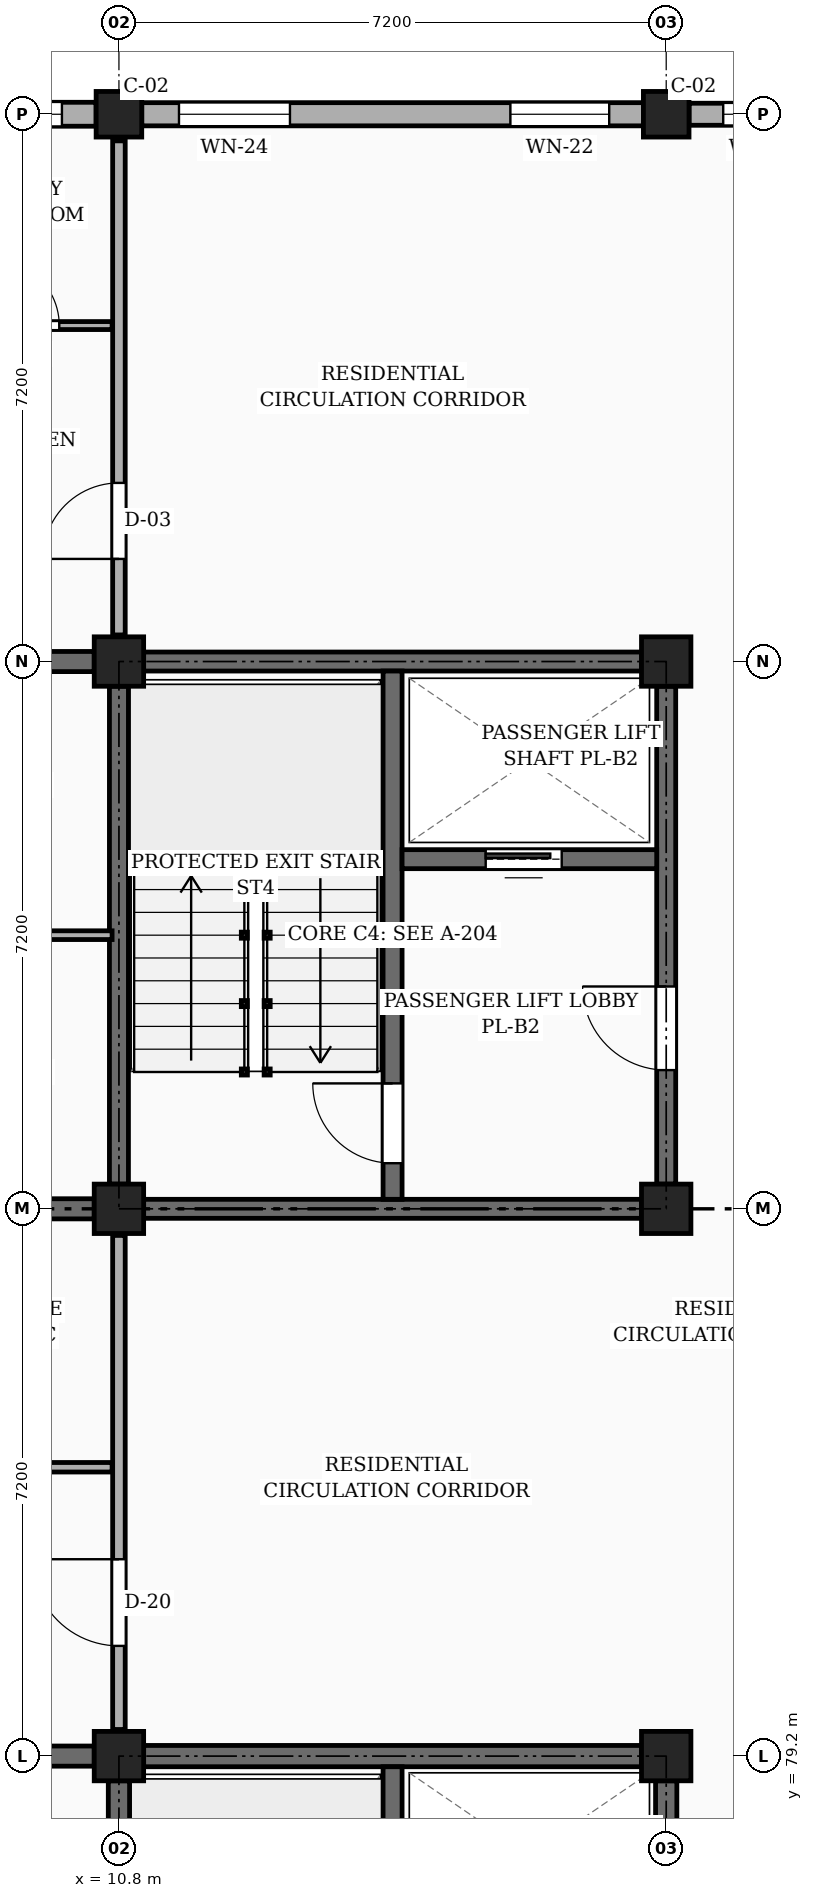
"""IFC4 building model, lengths in metres.
Left out: names, types, materials, properties, quantities, classifications, styles, units other than length and angle.
Written with IfcOpenShell. Run it as: python <this file> out.ifc"""

import sys

from ifc_helpers import new_model, si_unit, direction, frame, frame_2d, origin, origin_2d, place, context, subcontext, project, spatial, rectangle, extrude, element, fill, save


model = new_model("IFC4")
c1 = context("Model", 3, precision=1e-05, world=origin(), true_north=direction((0.0, 1.0)))
c2 = subcontext(c1, "Body", "Model", "MODEL_VIEW")
j1 = project(units=[si_unit("LENGTHUNIT", "METRE"), si_unit("PLANEANGLEUNIT", "RADIAN")], contexts=[c1])
p1 = place(None, origin())
s1 = spatial("IfcSite", under=j1, at=p1, CompositionType="ELEMENT")
p2 = place(p1, origin())
s2 = spatial("IfcBuilding", under=s1, at=p2, CompositionType="ELEMENT")
p3 = place(p2, frame((0.0, 0.0, 4.5)))
s3 = spatial("IfcBuildingStorey", under=s2, at=p3, CompositionType="ELEMENT", Elevation=4.5)
for number, where, z_axis, x_axis in (
    (1, (10.8, 79.2, 0.0), (0.0, 0.0, 1.0), (1.0, 0.0, 0.0)),
    (2, (10.8, 86.4, 0.0), (0.0, 0.0, 1.0), (1.0, 0.0, 0.0)),
    (3, (10.8, 93.6, 0.0), (0.0, 0.0, 1.0), (1.0, 0.0, 0.0)),
):
    element("IfcColumn", number, at=place(p3, frame(where, z_axis=z_axis, x_axis=x_axis)), inside=s3, PredefinedType="COLUMN", context=c2, shape_type="SweptSolid", body=[
        extrude(rectangle(XDim=0.65, YDim=0.65, at=origin_2d()), origin(), (0.0, 0.0, 1.0), 3.15),
    ])
p4 = place(p3, frame((10.8, 100.8, 0.0), z_axis=(0.0, 0.0, 1.0), x_axis=(1.0, 0.0, 0.0)))
e4 = element("IfcColumn", 4, at=p4, inside=s3, PredefinedType="COLUMN", context=c2, shape_type="SweptSolid", body=[
    extrude(rectangle(XDim=0.6, YDim=0.6, at=origin_2d()), origin(), (0.0, 0.0, 1.0), 3.15),
])
for number, where, z_axis, x_axis in (
    (5, (18.0, 79.2, 0.0), (0.0, 0.0, 1.0), (1.0, 0.0, 0.0)),
    (6, (18.0, 86.4, 0.0), (0.0, 0.0, 1.0), (1.0, 0.0, 0.0)),
    (7, (18.0, 93.6, 0.0), (0.0, 0.0, 1.0), (1.0, 0.0, 0.0)),
):
    element("IfcColumn", number, at=place(p3, frame(where, z_axis=z_axis, x_axis=x_axis)), inside=s3, PredefinedType="COLUMN", context=c2, shape_type="SweptSolid", body=[
        extrude(rectangle(XDim=0.65, YDim=0.65, at=origin_2d()), origin(), (0.0, 0.0, 1.0), 3.15),
    ])
p5 = place(p3, frame((18.0, 100.8, 0.0), z_axis=(0.0, 0.0, 1.0), x_axis=(1.0, 0.0, 0.0)))
e8 = element("IfcColumn", 8, at=p5, inside=s3, PredefinedType="COLUMN", context=c2, shape_type="SweptSolid", body=[
    extrude(rectangle(XDim=0.6, YDim=0.6, at=origin_2d()), origin(), (0.0, 0.0, 1.0), 3.15),
])
p6 = place(p3, frame((3.9, 79.2, 0.0), z_axis=(0.0, 0.0, 1.0), x_axis=(1.0, 0.0, 0.0)))
e9 = element("IfcWall", 9, at=p6, inside=s3, PredefinedType="SOLIDWALL", context=c2, shape_type="SweptSolid", body=[
    extrude(rectangle(XDim=6.575, YDim=0.265, at=frame_2d((3.288, 0.0))), origin(), (0.0, 0.0, 1.0), 2.21),
])
p7 = place(p3, frame((3.9, 86.4, 0.0), z_axis=(0.0, 0.0, 1.0), x_axis=(1.0, 0.0, 0.0)))
e10 = element("IfcWall", 10, at=p7, inside=s3, PredefinedType="SOLIDWALL", context=c2, shape_type="SweptSolid", body=[
    extrude(rectangle(XDim=6.575, YDim=0.265, at=frame_2d((3.288, 0.0))), origin(), (0.0, 0.0, 1.0), 2.21),
])
p8 = place(p7, frame((1.35, 0.0, 0.0)))
e11 = element("IfcOpeningElement", 11, at=p8, cuts=e10, PredefinedType="OPENING", context=c2, shape_type="SweptSolid", body=[
    extrude(rectangle(XDim=0.98, YDim=2.12, at=frame_2d((0.49, 1.06))), frame((0.0, 0.143, 0.0), z_axis=(0.0, -1.0, 0.0), x_axis=(1.0, 0.0, 0.0)), (0.0, 0.0, 1.0), 0.285),
])
p9 = place(p3, frame((3.9, 93.6, 0.0), z_axis=(0.0, 0.0, 1.0), x_axis=(1.0, 0.0, 0.0)))
e12 = element("IfcWall", 12, at=p9, inside=s3, PredefinedType="SOLIDWALL", context=c2, shape_type="SweptSolid", body=[
    extrude(rectangle(XDim=6.575, YDim=0.265, at=frame_2d((3.288, 0.0))), origin(), (0.0, 0.0, 1.0), 2.21),
])
p10 = place(p3, frame((24.9, 100.8, 0.0), z_axis=(0.0, 0.0, 1.0), x_axis=(-1.0, 0.0, 0.0)))
e13 = element("IfcWall", 13, at=p10, inside=s3, PredefinedType="SOLIDWALL", context=c2, shape_type="SweptSolid", body=[
    extrude(rectangle(XDim=6.6, YDim=0.29, at=frame_2d((3.3, 0.0))), origin(), (0.0, 0.0, 1.0), 2.48),
])
p11 = place(p10, frame((0.95, 0.0, 0.78)))
e14 = element("IfcOpeningElement", 14, at=p11, cuts=e13, PredefinedType="OPENING", context=c2, shape_type="SweptSolid", body=[
    extrude(rectangle(XDim=1.06, YDim=1.36, at=frame_2d((0.53, 0.68))), frame((0.0, 0.155, 0.0), z_axis=(0.0, -1.0, 0.0), x_axis=(1.0, 0.0, 0.0)), (0.0, 0.0, 1.0), 0.31),
])
p12 = place(p10, frame((3.2, 0.0, 0.78)))
e15 = element("IfcOpeningElement", 15, at=p12, cuts=e13, PredefinedType="OPENING", context=c2, shape_type="SweptSolid", body=[
    extrude(rectangle(XDim=1.22, YDim=1.36, at=frame_2d((0.61, 0.68))), frame((0.0, 0.155, 0.0), z_axis=(0.0, -1.0, 0.0), x_axis=(1.0, 0.0, 0.0)), (0.0, 0.0, 1.0), 0.31),
])
p13 = place(p10, frame((5.11, 0.0, 0.78)))
e16 = element("IfcOpeningElement", 16, at=p13, cuts=e13, PredefinedType="OPENING", context=c2, shape_type="SweptSolid", body=[
    extrude(rectangle(XDim=1.04, YDim=1.26, at=frame_2d((0.52, 0.63))), frame((0.0, 0.155, 0.0), z_axis=(0.0, -1.0, 0.0), x_axis=(1.0, 0.0, 0.0)), (0.0, 0.0, 1.0), 0.31),
])
p14 = place(p3, frame((17.7, 100.8, 0.0), z_axis=(0.0, 0.0, 1.0), x_axis=(-1.0, 0.0, 0.0)))
e17 = element("IfcWall", 17, at=p14, inside=s3, PredefinedType="SOLIDWALL", context=c2, shape_type="SweptSolid", body=[
    extrude(rectangle(XDim=6.6, YDim=0.305, at=frame_2d((3.3, 0.0))), origin(), (0.0, 0.0, 1.0), 2.48),
])
p15 = place(p14, frame((0.45, 0.0, 0.78)))
e18 = element("IfcOpeningElement", 18, at=p15, cuts=e17, PredefinedType="OPENING", context=c2, shape_type="SweptSolid", body=[
    extrude(rectangle(XDim=1.3, YDim=1.36, at=frame_2d((0.65, 0.68))), frame((0.0, 0.163, 0.0), z_axis=(0.0, -1.0, 0.0), x_axis=(1.0, 0.0, 0.0)), (0.0, 0.0, 1.0), 0.325),
])
p16 = place(p14, frame((4.65, 0.0, 0.78)))
e19 = element("IfcOpeningElement", 19, at=p16, cuts=e17, PredefinedType="OPENING", context=c2, shape_type="SweptSolid", body=[
    extrude(rectangle(XDim=1.46, YDim=1.36, at=frame_2d((0.73, 0.68))), frame((0.0, 0.163, 0.0), z_axis=(0.0, -1.0, 0.0), x_axis=(1.0, 0.0, 0.0)), (0.0, 0.0, 1.0), 0.325),
])
p17 = place(p3, frame((10.5, 100.8, 0.0), z_axis=(0.0, 0.0, 1.0), x_axis=(-1.0, 0.0, 0.0)))
e20 = element("IfcWall", 20, at=p17, inside=s3, PredefinedType="SOLIDWALL", context=c2, shape_type="SweptSolid", body=[
    extrude(rectangle(XDim=6.6, YDim=0.315, at=frame_2d((3.3, 0.0))), origin(), (0.0, 0.0, 1.0), 2.48),
])
p18 = place(p17, frame((0.45, 0.0, 0.78)))
e21 = element("IfcOpeningElement", 21, at=p18, cuts=e20, PredefinedType="OPENING", context=c2, shape_type="SweptSolid", body=[
    extrude(rectangle(XDim=1.36, YDim=1.26, at=frame_2d((0.68, 0.63))), frame((0.0, 0.167, 0.0), z_axis=(0.0, -1.0, 0.0), x_axis=(1.0, 0.0, 0.0)), (0.0, 0.0, 1.0), 0.335),
])
p19 = place(p17, frame((3.765, 0.0, 0.78)))
e22 = element("IfcOpeningElement", 22, at=p19, cuts=e20, PredefinedType="OPENING", context=c2, shape_type="SweptSolid", body=[
    extrude(rectangle(XDim=1.05, YDim=1.44, at=frame_2d((0.525, 0.72))), frame((0.0, 0.167, 0.0), z_axis=(0.0, -1.0, 0.0), x_axis=(1.0, 0.0, 0.0)), (0.0, 0.0, 1.0), 0.335),
])
for number, where, z_axis, x_axis in (
    (23, (10.8, 72.325, 0.0), (0.0, 0.0, 1.0), (0.0, 1.0, 0.0)),
    (24, (11.125, 79.2, 0.0), (0.0, 0.0, 1.0), (1.0, 0.0, 0.0)),
):
    element("IfcWall", number, at=place(p3, frame(where, z_axis=z_axis, x_axis=x_axis)), inside=s3, PredefinedType="SHEAR", context=c2, shape_type="SweptSolid", body=[
        extrude(rectangle(XDim=6.55, YDim=0.28, at=frame_2d((3.275, 0.0))), origin(), (0.0, 0.0, 1.0), 2.91),
    ])
p20 = place(p3, frame((18.0, 72.325, 0.0), z_axis=(0.0, 0.0, 1.0), x_axis=(0.0, 1.0, 0.0)))
e25 = element("IfcWall", 25, at=p20, inside=s3, PredefinedType="SHEAR", context=c2, shape_type="SweptSolid", body=[
    extrude(rectangle(XDim=6.55, YDim=0.28, at=frame_2d((3.275, 0.0))), origin(), (0.0, 0.0, 1.0), 2.91),
])
p21 = place(p20, frame((1.5, 0.0, 0.0)))
e26 = element("IfcOpeningElement", 26, at=p21, cuts=e25, PredefinedType="OPENING", context=c2, shape_type="SweptSolid", body=[
    extrude(rectangle(XDim=1.1, YDim=2.15, at=frame_2d((0.55, 1.075))), frame((0.0, 0.15, 0.0), z_axis=(0.0, -1.0, 0.0), x_axis=(1.0, 0.0, 0.0)), (0.0, 0.0, 1.0), 0.3),
])
p22 = place(p3, frame((14.4, 72.14, 0.0), z_axis=(0.0, 0.0, 1.0), x_axis=(0.0, 1.0, 0.0)))
e27 = element("IfcWall", 27, at=p22, inside=s3, PredefinedType="SHEAR", context=c2, shape_type="SweptSolid", body=[
    extrude(rectangle(XDim=6.92, YDim=0.25, at=frame_2d((3.46, 0.0))), origin(), (0.0, 0.0, 1.0), 2.91),
])
p23 = place(p22, frame((0.46, 0.0, 0.0)))
e28 = element("IfcOpeningElement", 28, at=p23, cuts=e27, PredefinedType="OPENING", context=c2, shape_type="SweptSolid", body=[
    extrude(rectangle(XDim=1.05, YDim=2.15, at=frame_2d((0.525, 1.075))), frame((0.0, 0.135, 0.0), z_axis=(0.0, -1.0, 0.0), x_axis=(1.0, 0.0, 0.0)), (0.0, 0.0, 1.0), 0.27),
])
p24 = place(p3, frame((10.8, 86.725, 0.0), z_axis=(0.0, 0.0, 1.0), x_axis=(0.0, 1.0, 0.0)))
e29 = element("IfcWall", 29, at=p24, inside=s3, PredefinedType="SHEAR", context=c2, shape_type="SweptSolid", body=[
    extrude(rectangle(XDim=6.55, YDim=0.25, at=frame_2d((3.275, 0.0))), origin(), (0.0, 0.0, 1.0), 2.91),
])
p25 = place(p3, frame((11.125, 93.6, 0.0), z_axis=(0.0, 0.0, 1.0), x_axis=(1.0, 0.0, 0.0)))
e30 = element("IfcWall", 30, at=p25, inside=s3, PredefinedType="SHEAR", context=c2, shape_type="SweptSolid", body=[
    extrude(rectangle(XDim=6.55, YDim=0.25, at=frame_2d((3.275, 0.0))), origin(), (0.0, 0.0, 1.0), 2.91),
])
p26 = place(p3, frame((18.0, 86.725, 0.0), z_axis=(0.0, 0.0, 1.0), x_axis=(0.0, 1.0, 0.0)))
e31 = element("IfcWall", 31, at=p26, inside=s3, PredefinedType="SHEAR", context=c2, shape_type="SweptSolid", body=[
    extrude(rectangle(XDim=6.55, YDim=0.25, at=frame_2d((3.275, 0.0))), origin(), (0.0, 0.0, 1.0), 2.91),
])
p27 = place(p26, frame((1.5, 0.0, 0.0)))
e32 = element("IfcOpeningElement", 32, at=p27, cuts=e31, PredefinedType="OPENING", context=c2, shape_type="SweptSolid", body=[
    extrude(rectangle(XDim=1.1, YDim=2.15, at=frame_2d((0.55, 1.075))), frame((0.0, 0.135, 0.0), z_axis=(0.0, -1.0, 0.0), x_axis=(1.0, 0.0, 0.0)), (0.0, 0.0, 1.0), 0.27),
])
p28 = place(p3, frame((11.125, 86.4, 0.0), z_axis=(0.0, 0.0, 1.0), x_axis=(1.0, 0.0, 0.0)))
e33 = element("IfcWall", 33, at=p28, inside=s3, PredefinedType="SHEAR", context=c2, shape_type="SweptSolid", body=[
    extrude(rectangle(XDim=6.55, YDim=0.25, at=frame_2d((3.275, 0.0))), origin(), (0.0, 0.0, 1.0), 2.91),
])
p29 = place(p3, frame((14.4, 86.525, 0.0), z_axis=(0.0, 0.0, 1.0), x_axis=(0.0, 1.0, 0.0)))
e34 = element("IfcWall", 34, at=p29, inside=s3, PredefinedType="SHEAR", context=c2, shape_type="SweptSolid", body=[
    extrude(rectangle(XDim=6.95, YDim=0.25, at=frame_2d((3.475, 0.0))), origin(), (0.0, 0.0, 1.0), 2.91),
])
p30 = place(p29, frame((0.475, 0.0, 0.0)))
e35 = element("IfcOpeningElement", 35, at=p30, cuts=e34, PredefinedType="OPENING", context=c2, shape_type="SweptSolid", body=[
    extrude(rectangle(XDim=1.05, YDim=2.15, at=frame_2d((0.525, 1.075))), frame((0.0, 0.135, 0.0), z_axis=(0.0, -1.0, 0.0), x_axis=(1.0, 0.0, 0.0)), (0.0, 0.0, 1.0), 0.27),
])
p31 = place(p3, frame((14.525, 91.0, 0.0), z_axis=(0.0, 0.0, 1.0), x_axis=(1.0, 0.0, 0.0)))
e36 = element("IfcWall", 36, at=p31, inside=s3, PredefinedType="SHEAR", context=c2, shape_type="SweptSolid", body=[
    extrude(rectangle(XDim=3.35, YDim=0.25, at=frame_2d((1.675, 0.0))), origin(), (0.0, 0.0, 1.0), 2.91),
])
p32 = place(p31, frame((1.1, 0.0, 0.0)))
e37 = element("IfcOpeningElement", 37, at=p32, cuts=e36, PredefinedType="OPENING", context=c2, shape_type="SweptSolid", body=[
    extrude(rectangle(XDim=1.0, YDim=2.2, at=frame_2d((0.5, 1.1))), frame((0.0, 0.135, 0.0), z_axis=(0.0, -1.0, 0.0), x_axis=(1.0, 0.0, 0.0)), (0.0, 0.0, 1.0), 0.27),
])
p33 = place(p3, frame((10.8, 79.55, 0.0), z_axis=(0.0, 0.0, 1.0), x_axis=(0.0, 1.0, 0.0)))
e38 = element("IfcWall", 38, at=p33, inside=s3, PredefinedType="PARTITIONING", context=c2, shape_type="SweptSolid", body=[
    extrude(rectangle(XDim=6.5, YDim=0.165, at=frame_2d((3.25, 0.0))), origin(), (0.0, 0.0, 1.0), 2.26),
])
p34 = place(p33, frame((1.1, 0.0, 0.0)))
e39 = element("IfcOpeningElement", 39, at=p34, cuts=e38, PredefinedType="OPENING", context=c2, shape_type="SweptSolid", body=[
    extrude(rectangle(XDim=1.14, YDim=2.18, at=frame_2d((0.57, 1.09))), frame((0.0, 0.093, 0.0), z_axis=(0.0, -1.0, 0.0), x_axis=(1.0, 0.0, 0.0)), (0.0, 0.0, 1.0), 0.185),
])
p35 = place(p3, frame((10.8, 93.95, 0.0), z_axis=(0.0, 0.0, 1.0), x_axis=(0.0, 1.0, 0.0)))
e40 = element("IfcWall", 40, at=p35, inside=s3, PredefinedType="PARTITIONING", context=c2, shape_type="SweptSolid", body=[
    extrude(rectangle(XDim=6.5, YDim=0.165, at=frame_2d((3.25, 0.0))), origin(), (0.0, 0.0, 1.0), 2.26),
])
p36 = place(p35, frame((1.0, 0.0, 0.0)))
e41 = element("IfcOpeningElement", 41, at=p36, cuts=e40, PredefinedType="OPENING", context=c2, shape_type="SweptSolid", body=[
    extrude(rectangle(XDim=1.0, YDim=2.15, at=frame_2d((0.5, 1.075))), frame((0.0, 0.093, 0.0), z_axis=(0.0, -1.0, 0.0), x_axis=(1.0, 0.0, 0.0)), (0.0, 0.0, 1.0), 0.185),
])
p37 = place(p3, frame((3.775, 83.0, 0.0), z_axis=(0.0, 0.0, 1.0), x_axis=(1.0, 0.0, 0.0)))
e42 = element("IfcWall", 42, at=p37, inside=s3, PredefinedType="PARTITIONING", context=c2, shape_type="SweptSolid", body=[
    extrude(rectangle(XDim=6.935, YDim=0.125, at=frame_2d((3.468, 0.0))), origin(), (0.0, 0.0, 1.0), 2.345),
])
p38 = place(p37, frame((4.6, 0.0, 0.0)))
e43 = element("IfcOpeningElement", 43, at=p38, cuts=e42, PredefinedType="OPENING", context=c2, shape_type="SweptSolid", body=[
    extrude(rectangle(XDim=0.87, YDim=2.05, at=frame_2d((0.435, 1.025))), frame((0.0, 0.073, 0.0), z_axis=(0.0, -1.0, 0.0), x_axis=(1.0, 0.0, 0.0)), (0.0, 0.0, 1.0), 0.145),
])
p39 = place(p37, frame((1.2, 0.0, 0.0)))
e44 = element("IfcOpeningElement", 44, at=p39, cuts=e42, PredefinedType="OPENING", context=c2, shape_type="SweptSolid", body=[
    extrude(rectangle(XDim=0.92, YDim=2.1, at=frame_2d((0.46, 1.05))), frame((0.0, 0.073, 0.0), z_axis=(0.0, -1.0, 0.0), x_axis=(1.0, 0.0, 0.0)), (0.0, 0.0, 1.0), 0.145),
])
p40 = place(p3, frame((3.775, 90.0, 0.0), z_axis=(0.0, 0.0, 1.0), x_axis=(1.0, 0.0, 0.0)))
e45 = element("IfcWall", 45, at=p40, inside=s3, PredefinedType="PARTITIONING", context=c2, shape_type="SweptSolid", body=[
    extrude(rectangle(XDim=6.935, YDim=0.115, at=frame_2d((3.468, 0.0))), origin(), (0.0, 0.0, 1.0), 2.345),
])
p41 = place(p40, frame((2.6, 0.0, 0.0)))
e46 = element("IfcOpeningElement", 46, at=p41, cuts=e45, PredefinedType="OPENING", context=c2, shape_type="SweptSolid", body=[
    extrude(rectangle(XDim=0.92, YDim=2.1, at=frame_2d((0.46, 1.05))), frame((0.0, 0.067, 0.0), z_axis=(0.0, -1.0, 0.0), x_axis=(1.0, 0.0, 0.0)), (0.0, 0.0, 1.0), 0.135),
])
p42 = place(p3, frame((8.45, 98.02, 0.0), z_axis=(0.0, 0.0, 1.0), x_axis=(1.0, 0.0, 0.0)))
e47 = element("IfcWall", 47, at=p42, inside=s3, PredefinedType="PARTITIONING", context=c2, shape_type="SweptSolid", body=[
    extrude(rectangle(XDim=2.26, YDim=0.105, at=frame_2d((1.13, 0.0))), origin(), (0.0, 0.0, 1.0), 2.345),
])
p43 = place(p42, frame((0.695, 0.0, 0.0)))
e48 = element("IfcOpeningElement", 48, at=p43, cuts=e47, PredefinedType="OPENING", context=c2, shape_type="SweptSolid", body=[
    extrude(rectangle(XDim=0.87, YDim=2.05, at=frame_2d((0.435, 1.025))), frame((0.0, 0.062, 0.0), z_axis=(0.0, -1.0, 0.0), x_axis=(1.0, 0.0, 0.0)), (0.0, 0.0, 1.0), 0.125),
])
p44 = place(p13, origin())
e49 = element("IfcWindow", 49, at=p44, inside=s3, PartitioningType="SINGLE_PANEL", PredefinedType="WINDOW", context=c2, shape_type="SweptSolid", body=[
    extrude(rectangle(XDim=1.04, YDim=1.26, at=frame_2d((0.52, 0.63))), frame((0.0, 0.03, 0.0), z_axis=(0.0, -1.0, 0.0), x_axis=(1.0, 0.0, 0.0)), (0.0, 0.0, 1.0), 0.06),
])
fill(e16, e49)
p45 = place(p15, origin())
e50 = element("IfcWindow", 50, at=p45, inside=s3, PartitioningType="SINGLE_PANEL", PredefinedType="WINDOW", context=c2, shape_type="SweptSolid", body=[
    extrude(rectangle(XDim=1.3, YDim=1.36, at=frame_2d((0.65, 0.68))), frame((0.0, 0.03, 0.0), z_axis=(0.0, -1.0, 0.0), x_axis=(1.0, 0.0, 0.0)), (0.0, 0.0, 1.0), 0.06),
])
fill(e18, e50)
p46 = place(p16, origin())
e51 = element("IfcWindow", 51, at=p46, inside=s3, PartitioningType="SINGLE_PANEL", PredefinedType="WINDOW", context=c2, shape_type="SweptSolid", body=[
    extrude(rectangle(XDim=1.46, YDim=1.36, at=frame_2d((0.73, 0.68))), frame((0.0, 0.03, 0.0), z_axis=(0.0, -1.0, 0.0), x_axis=(1.0, 0.0, 0.0)), (0.0, 0.0, 1.0), 0.06),
])
fill(e19, e51)
p47 = place(p18, origin())
e52 = element("IfcWindow", 52, at=p47, inside=s3, PartitioningType="SINGLE_PANEL", PredefinedType="WINDOW", context=c2, shape_type="SweptSolid", body=[
    extrude(rectangle(XDim=1.36, YDim=1.26, at=frame_2d((0.68, 0.63))), frame((0.0, 0.03, 0.0), z_axis=(0.0, -1.0, 0.0), x_axis=(1.0, 0.0, 0.0)), (0.0, 0.0, 1.0), 0.06),
])
fill(e21, e52)
p48 = place(p27, frame((1.1, 0.0, 0.0), z_axis=(0.0, 0.0, 1.0), x_axis=(-1.0, 0.0, 0.0)))
e53 = element("IfcDoor", 53, at=p48, inside=s3, OperationType="SINGLE_SWING_RIGHT", PredefinedType="DOOR", context=c2, shape_type="SweptSolid", body=[
    extrude(rectangle(XDim=1.1, YDim=2.15, at=frame_2d((0.55, 1.075))), frame((0.0, 0.025, 0.0), z_axis=(0.0, -1.0, 0.0), x_axis=(1.0, 0.0, 0.0)), (0.0, 0.0, 1.0), 0.05),
])
fill(e32, e53)
p49 = place(p30, origin())
e54 = element("IfcDoor", 54, at=p49, inside=s3, OperationType="SINGLE_SWING_RIGHT", PredefinedType="DOOR", context=c2, shape_type="SweptSolid", body=[
    extrude(rectangle(XDim=1.05, YDim=2.15, at=frame_2d((0.525, 1.075))), frame((0.0, 0.025, 0.0), z_axis=(0.0, -1.0, 0.0), x_axis=(1.0, 0.0, 0.0)), (0.0, 0.0, 1.0), 0.05),
])
fill(e35, e54)
p50 = place(p32, origin())
e55 = element("IfcDoor", 55, at=p50, inside=s3, OperationType="SLIDING_TO_LEFT", PredefinedType="DOOR", context=c2, shape_type="SweptSolid", body=[
    extrude(rectangle(XDim=1.0, YDim=2.2, at=frame_2d((0.5, 1.1))), frame((0.0, 0.025, 0.0), z_axis=(0.0, -1.0, 0.0), x_axis=(1.0, 0.0, 0.0)), (0.0, 0.0, 1.0), 0.05),
])
fill(e37, e55)
p51 = place(p34, origin())
e56 = element("IfcDoor", 56, at=p51, inside=s3, OperationType="SINGLE_SWING_RIGHT", PredefinedType="DOOR", context=c2, shape_type="SweptSolid", body=[
    extrude(rectangle(XDim=1.14, YDim=2.18, at=frame_2d((0.57, 1.09))), frame((0.0, 0.025, 0.0), z_axis=(0.0, -1.0, 0.0), x_axis=(1.0, 0.0, 0.0)), (0.0, 0.0, 1.0), 0.05),
])
fill(e39, e56)
p52 = place(p36, origin())
e57 = element("IfcDoor", 57, at=p52, inside=s3, OperationType="SINGLE_SWING_LEFT", PredefinedType="DOOR", context=c2, shape_type="SweptSolid", body=[
    extrude(rectangle(XDim=1.0, YDim=2.15, at=frame_2d((0.5, 1.075))), frame((0.0, 0.025, 0.0), z_axis=(0.0, -1.0, 0.0), x_axis=(1.0, 0.0, 0.0)), (0.0, 0.0, 1.0), 0.05),
])
fill(e41, e57)
p53 = place(p43, origin())
e58 = element("IfcDoor", 58, at=p53, inside=s3, OperationType="SINGLE_SWING_LEFT", PredefinedType="DOOR", context=c2, shape_type="SweptSolid", body=[
    extrude(rectangle(XDim=0.87, YDim=2.05, at=frame_2d((0.435, 1.025))), frame((0.0, 0.025, 0.0), z_axis=(0.0, -1.0, 0.0), x_axis=(1.0, 0.0, 0.0)), (0.0, 0.0, 1.0), 0.05),
])
fill(e48, e58)
save(model, sys.argv[1])
